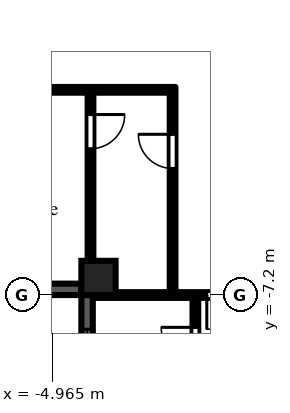
"""IFC4 building model, lengths in metres.
Left out: names, types, materials, properties, quantities, classifications, styles, units other than length and angle.
Written with IfcOpenShell. Run it as: python <this file> out.ifc"""

import sys

from ifc_helpers import new_model, si_unit, direction, frame, frame_2d, origin, origin_2d, place, context, subcontext, project, spatial, rectangle, extrude, element, fill, save


model = new_model("IFC4")
c1 = context("Model", 3, precision=1e-05, world=origin(), true_north=direction((0.0, 1.0)))
c2 = subcontext(c1, "Body", "Model", "MODEL_VIEW")
j1 = project(units=[si_unit("LENGTHUNIT", "METRE"), si_unit("PLANEANGLEUNIT", "RADIAN")], contexts=[c1])
p1 = place(None, origin())
s1 = spatial("IfcSite", under=j1, at=p1, CompositionType="ELEMENT")
p2 = place(p1, origin())
s2 = spatial("IfcBuilding", under=s1, at=p2, CompositionType="ELEMENT")
p3 = place(p2, frame((0.0, 0.0, 116.1)))
s3 = spatial("IfcBuildingStorey", under=s2, at=p3, CompositionType="ELEMENT", Elevation=116.1)
p4 = place(p3, frame((-3.75, -6.75, 0.0), z_axis=(0.0, 0.0, 1.0), x_axis=(1.0, 0.0, 0.0)))
e1 = element("IfcColumn", 1, at=p4, inside=s3, PredefinedType="COLUMN", context=c2, shape_type="SweptSolid", body=[
    extrude(rectangle(XDim=0.9, YDim=0.9, at=origin_2d()), origin(), (0.0, 0.0, 1.0), 4.2),
])
p5 = place(p3, frame((-7.2, -7.05, 0.0), z_axis=(0.0, 0.0, 1.0), x_axis=(1.0, 0.0, 0.0)))
e2 = element("IfcWall", 2, at=p5, inside=s3, PredefinedType="SOLIDWALL", context=c2, shape_type="SweptSolid", body=[
    extrude(rectangle(XDim=3.0, YDim=0.3, at=frame_2d((1.5, 0.0))), origin(), (0.0, 0.0, 1.0), 3.4),
])
p6 = place(p3, frame((-4.05, -7.2, 0.0), z_axis=(0.0, 0.0, 1.0), x_axis=(0.0, -1.0, 0.0)))
e3 = element("IfcWall", 3, at=p6, inside=s3, PredefinedType="SOLIDWALL", context=c2, shape_type="SweptSolid", body=[
    extrude(rectangle(XDim=7.2, YDim=0.3, at=frame_2d((3.6, 0.0))), origin(), (0.0, 0.0, 1.0), 3.4),
])
p7 = place(p6, frame((3.0, 0.0, 0.0)))
e4 = element("IfcOpeningElement", 4, at=p7, cuts=e3, PredefinedType="OPENING", context=c2, shape_type="SweptSolid", body=[
    extrude(rectangle(XDim=1.2, YDim=2.05, at=frame_2d((0.6, 1.025))), frame((0.0, 0.16, 0.0), z_axis=(0.0, -1.0, 0.0), x_axis=(1.0, 0.0, 0.0)), (0.0, 0.0, 1.0), 0.32),
])
p8 = place(p6, frame((0.9, 0.0, 0.2)))
e5 = element("IfcOpeningElement", 5, at=p8, cuts=e3, PredefinedType="OPENING", context=c2, shape_type="SweptSolid", body=[
    extrude(rectangle(XDim=1.8, YDim=1.85, at=frame_2d((0.9, 0.925))), frame((0.0, 0.16, 0.0), z_axis=(0.0, -1.0, 0.0), x_axis=(1.0, 0.0, 0.0)), (0.0, 0.0, 1.0), 0.32),
])
p9 = place(p6, frame((4.5, 0.0, 0.2)))
e6 = element("IfcOpeningElement", 6, at=p9, cuts=e3, PredefinedType="OPENING", context=c2, shape_type="SweptSolid", body=[
    extrude(rectangle(XDim=1.8, YDim=1.85, at=frame_2d((0.9, 0.925))), frame((0.0, 0.16, 0.0), z_axis=(0.0, -1.0, 0.0), x_axis=(1.0, 0.0, 0.0)), (0.0, 0.0, 1.0), 0.32),
])
p10 = place(p3, frame((-7.2, -1.8, 0.0), z_axis=(0.0, 0.0, 1.0), x_axis=(1.0, 0.0, 0.0)))
e7 = element("IfcWall", 7, at=p10, inside=s3, PredefinedType="PARTITIONING", context=c2, shape_type="SweptSolid", body=[
    extrude(rectangle(XDim=5.325, YDim=0.15, at=frame_2d((2.663, 0.0))), origin(), (0.0, 0.0, 1.0), 3.8),
])
p11 = place(p10, frame((1.17, 0.0, 0.0)))
e8 = element("IfcOpeningElement", 8, at=p11, cuts=e7, PredefinedType="OPENING", context=c2, shape_type="SweptSolid", body=[
    extrude(rectangle(XDim=0.9, YDim=2.1, at=frame_2d((0.45, 1.05))), frame((0.0, 0.085, 0.0), z_axis=(0.0, -1.0, 0.0), x_axis=(1.0, 0.0, 0.0)), (0.0, 0.0, 1.0), 0.17),
])
p12 = place(p3, frame((-3.96, -6.9, 0.0), z_axis=(0.0, 0.0, 1.0), x_axis=(0.0, 1.0, 0.0)))
e9 = element("IfcWall", 9, at=p12, inside=s3, PredefinedType="PARTITIONING", context=c2, shape_type="SweptSolid", body=[
    extrude(rectangle(XDim=5.025, YDim=0.15, at=frame_2d((2.512, 0.0))), origin(), (0.0, 0.0, 1.0), 3.8),
])
p13 = place(p12, frame((3.55, 0.0, 0.0)))
e10 = element("IfcOpeningElement", 10, at=p13, cuts=e9, PredefinedType="OPENING", context=c2, shape_type="SweptSolid", body=[
    extrude(rectangle(XDim=0.9, YDim=2.1, at=frame_2d((0.45, 1.05))), frame((0.0, 0.085, 0.0), z_axis=(0.0, -1.0, 0.0), x_axis=(1.0, 0.0, 0.0)), (0.0, 0.0, 1.0), 0.17),
])
p14 = place(p3, frame((-3.9, -7.2, 0.0), z_axis=(0.0, 0.0, 1.0), x_axis=(1.0, 0.0, 0.0)))
e11 = element("IfcWall", 11, at=p14, inside=s3, PredefinedType="PARTITIONING", context=c2, shape_type="SweptSolid", body=[
    extrude(rectangle(XDim=5.7, YDim=0.15, at=frame_2d((2.85, 0.0))), origin(), (0.0, 0.0, 1.0), 3.8),
])
p15 = place(p14, frame((3.0, 0.0, 0.0)))
e12 = element("IfcOpeningElement", 12, at=p15, cuts=e11, PredefinedType="OPENING", context=c2, shape_type="SweptSolid", body=[
    extrude(rectangle(XDim=1.8, YDim=2.1, at=frame_2d((0.9, 1.05))), frame((0.0, 0.085, 0.0), z_axis=(0.0, -1.0, 0.0), x_axis=(1.0, 0.0, 0.0)), (0.0, 0.0, 1.0), 0.17),
])
p16 = place(p3, frame((-1.8, -7.125, 0.0), z_axis=(0.0, 0.0, 1.0), x_axis=(0.0, 1.0, 0.0)))
e13 = element("IfcWall", 13, at=p16, inside=s3, PredefinedType="PARTITIONING", context=c2, shape_type="SweptSolid", body=[
    extrude(rectangle(XDim=5.4, YDim=0.15, at=frame_2d((2.7, 0.0))), origin(), (0.0, 0.0, 1.0), 3.8),
])
p17 = place(p16, frame((3.255, 0.0, 0.0)))
e14 = element("IfcOpeningElement", 14, at=p17, cuts=e13, PredefinedType="OPENING", context=c2, shape_type="SweptSolid", body=[
    extrude(rectangle(XDim=0.9, YDim=2.1, at=frame_2d((0.45, 1.05))), frame((0.0, 0.085, 0.0), z_axis=(0.0, -1.0, 0.0), x_axis=(1.0, 0.0, 0.0)), (0.0, 0.0, 1.0), 0.17),
])
p18 = place(p3, frame((-1.2, -16.725, 0.0), z_axis=(0.0, 0.0, 1.0), x_axis=(0.0, 1.0, 0.0)))
e15 = element("IfcWall", 15, at=p18, inside=s3, PredefinedType="PARTITIONING", context=c2, shape_type="SweptSolid", body=[
    extrude(rectangle(XDim=9.45, YDim=0.15, at=frame_2d((4.725, 0.0))), origin(), (0.0, 0.0, 1.0), 3.8),
])
p19 = place(p18, frame((0.575, 0.0, 0.0)))
e16 = element("IfcOpeningElement", 16, at=p19, cuts=e15, PredefinedType="OPENING", context=c2, shape_type="SweptSolid", body=[
    extrude(rectangle(XDim=1.8, YDim=2.1, at=frame_2d((0.9, 1.05))), frame((0.0, 0.085, 0.0), z_axis=(0.0, -1.0, 0.0), x_axis=(1.0, 0.0, 0.0)), (0.0, 0.0, 1.0), 0.17),
])
p20 = place(p18, frame((3.825, 0.0, 0.0)))
e17 = element("IfcOpeningElement", 17, at=p20, cuts=e15, PredefinedType="OPENING", context=c2, shape_type="SweptSolid", body=[
    extrude(rectangle(XDim=1.8, YDim=2.1, at=frame_2d((0.9, 1.05))), frame((0.0, 0.085, 0.0), z_axis=(0.0, -1.0, 0.0), x_axis=(1.0, 0.0, 0.0)), (0.0, 0.0, 1.0), 0.17),
])
p21 = place(p18, frame((6.875, 0.0, 0.0)))
e18 = element("IfcOpeningElement", 18, at=p21, cuts=e15, PredefinedType="OPENING", context=c2, shape_type="SweptSolid", body=[
    extrude(rectangle(XDim=1.8, YDim=2.1, at=frame_2d((0.9, 1.05))), frame((0.0, 0.085, 0.0), z_axis=(0.0, -1.0, 0.0), x_axis=(1.0, 0.0, 0.0)), (0.0, 0.0, 1.0), 0.17),
])
p22 = place(p8, origin())
e19 = element("IfcWindow", 19, at=p22, inside=s3, PartitioningType="SINGLE_PANEL", PredefinedType="WINDOW", context=c2, shape_type="SweptSolid", body=[
    extrude(rectangle(XDim=1.8, YDim=1.85, at=frame_2d((0.9, 0.925))), frame((0.0, 0.03, 0.0), z_axis=(0.0, -1.0, 0.0), x_axis=(1.0, 0.0, 0.0)), (0.0, 0.0, 1.0), 0.06),
])
fill(e5, e19)
p23 = place(p13, frame((0.9, 0.0, 0.0), z_axis=(0.0, 0.0, 1.0), x_axis=(-1.0, 0.0, 0.0)))
e20 = element("IfcDoor", 20, at=p23, inside=s3, OperationType="SINGLE_SWING_LEFT", PredefinedType="DOOR", context=c2, shape_type="SweptSolid", body=[
    extrude(rectangle(XDim=0.9, YDim=2.1, at=frame_2d((0.45, 1.05))), frame((0.0, 0.025, 0.0), z_axis=(0.0, -1.0, 0.0), x_axis=(1.0, 0.0, 0.0)), (0.0, 0.0, 1.0), 0.05),
])
fill(e10, e20)
p24 = place(p17, origin())
e21 = element("IfcDoor", 21, at=p24, inside=s3, OperationType="SINGLE_SWING_RIGHT", PredefinedType="DOOR", context=c2, shape_type="SweptSolid", body=[
    extrude(rectangle(XDim=0.9, YDim=2.1, at=frame_2d((0.45, 1.05))), frame((0.0, 0.025, 0.0), z_axis=(0.0, -1.0, 0.0), x_axis=(1.0, 0.0, 0.0)), (0.0, 0.0, 1.0), 0.05),
])
fill(e14, e21)
p25 = place(p15, frame((1.8, 0.0, 0.0), z_axis=(0.0, 0.0, 1.0), x_axis=(-1.0, 0.0, 0.0)))
e22 = element("IfcDoor", 22, at=p25, inside=s3, OperationType="DOUBLE_DOOR_DOUBLE_SWING", PredefinedType="DOOR", context=c2, shape_type="SweptSolid", body=[
    extrude(rectangle(XDim=1.8, YDim=2.1, at=frame_2d((0.9, 1.05))), frame((0.0, 0.025, 0.0), z_axis=(0.0, -1.0, 0.0), x_axis=(1.0, 0.0, 0.0)), (0.0, 0.0, 1.0), 0.05),
])
fill(e12, e22)
p26 = place(p21, origin())
e23 = element("IfcDoor", 23, at=p26, inside=s3, OperationType="DOUBLE_DOOR_DOUBLE_SWING", PredefinedType="DOOR", context=c2, shape_type="SweptSolid", body=[
    extrude(rectangle(XDim=1.8, YDim=2.1, at=frame_2d((0.9, 1.05))), frame((0.0, 0.025, 0.0), z_axis=(0.0, -1.0, 0.0), x_axis=(1.0, 0.0, 0.0)), (0.0, 0.0, 1.0), 0.05),
])
fill(e18, e23)
save(model, sys.argv[1])
